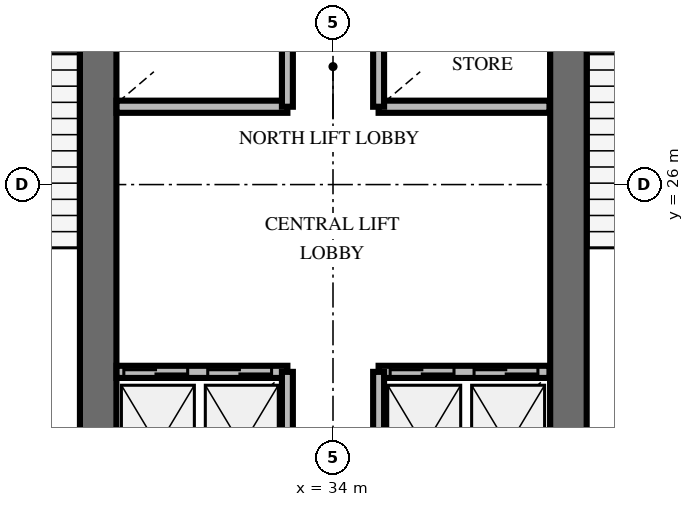
"""IFC4 building model, lengths in metres.
Left out: names, types, materials, properties, quantities, classifications, styles, units other than length and angle.
Written with IfcOpenShell. Run it as: python <this file> out.ifc"""

import sys

from ifc_helpers import new_model, si_unit, direction, frame, frame_2d, origin, place, context, subcontext, project, spatial, rectangle, extrude, element, fill, save


model = new_model("IFC4")
c1 = context("Model", 3, precision=1e-05, world=origin(), true_north=direction((0.0, 1.0)))
c2 = subcontext(c1, "Body", "Model", "MODEL_VIEW")
j1 = project(units=[si_unit("LENGTHUNIT", "METRE"), si_unit("PLANEANGLEUNIT", "RADIAN")], contexts=[c1])
p1 = place(None, origin())
s1 = spatial("IfcSite", under=j1, at=p1, CompositionType="ELEMENT")
p2 = place(p1, origin())
s2 = spatial("IfcBuilding", under=s1, at=p2, CompositionType="ELEMENT")
p3 = place(p2, frame((0.0, 0.0, 133.8)))
s3 = spatial("IfcBuildingStorey", under=s2, at=p3, CompositionType="ELEMENT", Elevation=133.8)
for number, where, z_axis, x_axis in (
    (1, (30.138, 20.187, 0.0), (0.0, 0.0, 1.0), (0.0, 1.0, 0.0)),
    (2, (37.872, 20.187, 0.0), (0.0, 0.0, 1.0), (0.0, 1.0, 0.0)),
):
    element("IfcWall", number, at=place(p3, frame(where, z_axis=z_axis, x_axis=x_axis)), inside=s3, PredefinedType="SHEAR", context=c2, shape_type="SweptSolid", body=[
        extrude(rectangle(XDim=9.826, YDim=0.6, at=frame_2d((4.913, 0.0))), origin(), (0.0, 0.0, 1.0), 4.0),
    ])
p4 = place(p3, frame((30.44, 22.92, 0.0), z_axis=(0.0, 0.0, 1.0), x_axis=(1.0, 0.0, 0.0)))
e3 = element("IfcWall", 3, at=p4, inside=s3, PredefinedType="SOLIDWALL", context=c2, shape_type="SweptSolid", body=[
    extrude(rectangle(XDim=2.81, YDim=0.2, at=frame_2d((1.405, 0.0))), origin(), (0.0, 0.0, 1.0), 2.8),
])
p5 = place(p4, frame((0.12, 0.0, 0.0)))
e4 = element("IfcOpeningElement", 4, at=p5, cuts=e3, PredefinedType="OPENING", context=c2, shape_type="SweptSolid", body=[
    extrude(rectangle(XDim=1.05, YDim=2.1, at=frame_2d((0.525, 1.05))), frame((0.0, 0.11, 0.0), z_axis=(0.0, -1.0, 0.0), x_axis=(1.0, 0.0, 0.0)), (0.0, 0.0, 1.0), 0.22),
])
p6 = place(p4, frame((1.5, 0.0, 0.0)))
e5 = element("IfcOpeningElement", 5, at=p6, cuts=e3, PredefinedType="OPENING", context=c2, shape_type="SweptSolid", body=[
    extrude(rectangle(XDim=1.05, YDim=2.1, at=frame_2d((0.525, 1.05))), frame((0.0, 0.11, 0.0), z_axis=(0.0, -1.0, 0.0), x_axis=(1.0, 0.0, 0.0)), (0.0, 0.0, 1.0), 0.22),
])
p7 = place(p3, frame((33.25, 20.5, 0.0), z_axis=(0.0, 0.0, 1.0), x_axis=(0.0, 1.0, 0.0)))
e6 = element("IfcWall", 6, at=p7, inside=s3, PredefinedType="SOLIDWALL", context=c2, shape_type="SweptSolid", body=[
    extrude(rectangle(XDim=2.42, YDim=0.18, at=frame_2d((1.21, 0.0))), origin(), (0.0, 0.0, 1.0), 2.8),
])
p8 = place(p3, frame((34.75, 22.92, 0.0), z_axis=(0.0, 0.0, 1.0), x_axis=(1.0, 0.0, 0.0)))
e7 = element("IfcWall", 7, at=p8, inside=s3, PredefinedType="SOLIDWALL", context=c2, shape_type="SweptSolid", body=[
    extrude(rectangle(XDim=2.81, YDim=0.2, at=frame_2d((1.405, 0.0))), origin(), (0.0, 0.0, 1.0), 2.8),
])
p9 = place(p8, frame((0.19, 0.0, 0.0)))
e8 = element("IfcOpeningElement", 8, at=p9, cuts=e7, PredefinedType="OPENING", context=c2, shape_type="SweptSolid", body=[
    extrude(rectangle(XDim=1.05, YDim=2.1, at=frame_2d((0.525, 1.05))), frame((0.0, 0.11, 0.0), z_axis=(0.0, -1.0, 0.0), x_axis=(1.0, 0.0, 0.0)), (0.0, 0.0, 1.0), 0.22),
])
p10 = place(p8, frame((1.57, 0.0, 0.0)))
e9 = element("IfcOpeningElement", 9, at=p10, cuts=e7, PredefinedType="OPENING", context=c2, shape_type="SweptSolid", body=[
    extrude(rectangle(XDim=1.05, YDim=2.1, at=frame_2d((0.525, 1.05))), frame((0.0, 0.11, 0.0), z_axis=(0.0, -1.0, 0.0), x_axis=(1.0, 0.0, 0.0)), (0.0, 0.0, 1.0), 0.22),
])
p11 = place(p3, frame((34.75, 20.5, 0.0), z_axis=(0.0, 0.0, 1.0), x_axis=(0.0, 1.0, 0.0)))
e10 = element("IfcWall", 10, at=p11, inside=s3, PredefinedType="SOLIDWALL", context=c2, shape_type="SweptSolid", body=[
    extrude(rectangle(XDim=2.42, YDim=0.18, at=frame_2d((1.21, 0.0))), origin(), (0.0, 0.0, 1.0), 2.8),
])
p12 = place(p3, frame((30.44, 27.28, 0.0), z_axis=(0.0, 0.0, 1.0), x_axis=(1.0, 0.0, 0.0)))
e11 = element("IfcWall", 11, at=p12, inside=s3, PredefinedType="SOLIDWALL", context=c2, shape_type="SweptSolid", body=[
    extrude(rectangle(XDim=2.81, YDim=0.2, at=frame_2d((1.405, 0.0))), origin(), (0.0, 0.0, 1.0), 2.8),
])
p13 = place(p3, frame((33.25, 27.28, 0.0), z_axis=(0.0, 0.0, 1.0), x_axis=(0.0, 1.0, 0.0)))
e12 = element("IfcWall", 12, at=p13, inside=s3, PredefinedType="SOLIDWALL", context=c2, shape_type="SweptSolid", body=[
    extrude(rectangle(XDim=2.47, YDim=0.18, at=frame_2d((1.235, 0.0))), origin(), (0.0, 0.0, 1.0), 2.8),
])
p14 = place(p3, frame((34.75, 27.28, 0.0), z_axis=(0.0, 0.0, 1.0), x_axis=(1.0, 0.0, 0.0)))
e13 = element("IfcWall", 13, at=p14, inside=s3, PredefinedType="SOLIDWALL", context=c2, shape_type="SweptSolid", body=[
    extrude(rectangle(XDim=2.81, YDim=0.2, at=frame_2d((1.405, 0.0))), origin(), (0.0, 0.0, 1.0), 2.8),
])
p15 = place(p3, frame((34.75, 27.28, 0.0), z_axis=(0.0, 0.0, 1.0), x_axis=(0.0, 1.0, 0.0)))
e14 = element("IfcWall", 14, at=p15, inside=s3, PredefinedType="SOLIDWALL", context=c2, shape_type="SweptSolid", body=[
    extrude(rectangle(XDim=2.47, YDim=0.18, at=frame_2d((1.235, 0.0))), origin(), (0.0, 0.0, 1.0), 2.8),
])
p16 = place(p5, origin())
e15 = element("IfcDoor", 15, at=p16, inside=s3, OperationType="DOUBLE_DOOR_SLIDING", PredefinedType="USERDEFINED", context=c2, shape_type="SweptSolid", body=[
    extrude(rectangle(XDim=1.05, YDim=2.1, at=frame_2d((0.525, 1.05))), frame((0.0, 0.025, 0.0), z_axis=(0.0, -1.0, 0.0), x_axis=(1.0, 0.0, 0.0)), (0.0, 0.0, 1.0), 0.05),
])
fill(e4, e15)
p17 = place(p6, origin())
e16 = element("IfcDoor", 16, at=p17, inside=s3, OperationType="DOUBLE_DOOR_SLIDING", PredefinedType="USERDEFINED", context=c2, shape_type="SweptSolid", body=[
    extrude(rectangle(XDim=1.05, YDim=2.1, at=frame_2d((0.525, 1.05))), frame((0.0, 0.025, 0.0), z_axis=(0.0, -1.0, 0.0), x_axis=(1.0, 0.0, 0.0)), (0.0, 0.0, 1.0), 0.05),
])
fill(e5, e16)
p18 = place(p9, origin())
e17 = element("IfcDoor", 17, at=p18, inside=s3, OperationType="DOUBLE_DOOR_SLIDING", PredefinedType="USERDEFINED", context=c2, shape_type="SweptSolid", body=[
    extrude(rectangle(XDim=1.05, YDim=2.1, at=frame_2d((0.525, 1.05))), frame((0.0, 0.025, 0.0), z_axis=(0.0, -1.0, 0.0), x_axis=(1.0, 0.0, 0.0)), (0.0, 0.0, 1.0), 0.05),
])
fill(e8, e17)
p19 = place(p10, origin())
e18 = element("IfcDoor", 18, at=p19, inside=s3, OperationType="DOUBLE_DOOR_SLIDING", PredefinedType="USERDEFINED", context=c2, shape_type="SweptSolid", body=[
    extrude(rectangle(XDim=1.05, YDim=2.1, at=frame_2d((0.525, 1.05))), frame((0.0, 0.025, 0.0), z_axis=(0.0, -1.0, 0.0), x_axis=(1.0, 0.0, 0.0)), (0.0, 0.0, 1.0), 0.05),
])
fill(e9, e18)
save(model, sys.argv[1])
